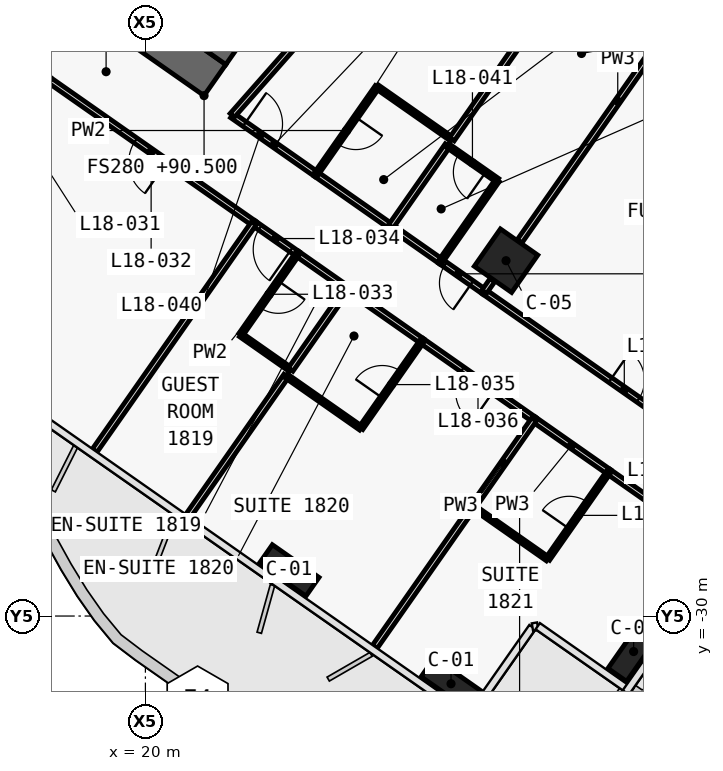
"""IFC4 building model, lengths in metres.
Left out: names, types, materials, properties, quantities, classifications, styles, units other than length and angle.
Written with IfcOpenShell. Run it as: python <this file> out.ifc"""

import sys

from ifc_helpers import new_model, si_unit, direction, frame, frame_2d, origin, origin_2d, place, context, subcontext, project, spatial, polyline, rectangle, outline, extrude, element, fill, save


model = new_model("IFC4")
c1 = context("Model", 3, precision=1e-05, world=origin(), true_north=direction((0.0, 1.0)))
c2 = subcontext(c1, "Body", "Model", "MODEL_VIEW")
j1 = project(units=[si_unit("LENGTHUNIT", "METRE"), si_unit("PLANEANGLEUNIT", "RADIAN")], contexts=[c1])
p1 = place(None, origin())
s1 = spatial("IfcSite", under=j1, at=p1, CompositionType="ELEMENT")
p2 = place(p1, origin())
s2 = spatial("IfcBuilding", under=s1, at=p2, CompositionType="ELEMENT")
p3 = place(p2, frame((0.0, 0.0, 90.5)))
s3 = spatial("IfcBuildingStorey", under=s2, at=p3, CompositionType="ELEMENT", Elevation=90.5)
p4 = place(p3, frame((-0.037, -0.585, 0.0), z_axis=(0.0, 0.0, 1.0), x_axis=(0.819157152511, -0.573569140985, 0.0)))
e1 = element("IfcWall", 1, at=p4, inside=s3, PredefinedType="SHEAR", context=c2, shape_type="SweptSolid", body=[
    extrude(outline(polyline([(26.695, 0.5), (0.0, 0.5), (0.7, -0.5), (26.695, -0.5), (26.695, 0.5)])), origin(), (0.0, 0.0, 1.0), 3.6),
])
p5 = place(p4, frame((1.045, 0.0, 0.0)))
e2 = element("IfcOpeningElement", 2, at=p5, cuts=e1, PredefinedType="OPENING", context=c2, shape_type="SweptSolid", body=[
    extrude(rectangle(XDim=1.5, YDim=2.1, at=frame_2d((0.75, 1.05))), frame((0.0, 0.51, 0.0), z_axis=(0.0, -1.0, 0.0), x_axis=(1.0, 0.0, 0.0)), (0.0, 0.0, 1.0), 1.02),
])
p6 = place(p4, frame((12.445, 0.0, 0.0)))
e3 = element("IfcOpeningElement", 3, at=p6, cuts=e1, PredefinedType="OPENING", context=c2, shape_type="SweptSolid", body=[
    extrude(rectangle(XDim=1.5, YDim=2.1, at=frame_2d((0.75, 1.05))), frame((0.0, 0.51, 0.0), z_axis=(0.0, -1.0, 0.0), x_axis=(1.0, 0.0, 0.0)), (0.0, 0.0, 1.0), 1.02),
])
p7 = place(p3, frame((21.708, -15.2, 0.0), z_axis=(0.0, 0.0, 1.0), x_axis=(0.573576324356, 0.819152122709, 0.0)))
e4 = element("IfcWall", 4, at=p7, inside=s3, PredefinedType="SHEAR", context=c2, shape_type="SweptSolid", body=[
    extrude(outline(polyline([(9.2, 0.5), (0.0, 0.5), (0.0, -0.5), (9.2, -0.5), (9.2, 0.5)])), origin(), (0.0, 0.0, 1.0), 3.6),
])
p8 = place(p7, frame((6.1, 0.0, 0.0)))
e5 = element("IfcOpeningElement", 5, at=p8, cuts=e4, PredefinedType="OPENING", context=c2, shape_type="SweptSolid", body=[
    extrude(rectangle(XDim=1.8, YDim=2.1, at=frame_2d((0.9, 1.05))), frame((0.0, 0.51, 0.0), z_axis=(0.0, -1.0, 0.0), x_axis=(1.0, 0.0, 0.0)), (0.0, 0.0, 1.0), 1.02),
])
p9 = place(p7, frame((1.9, 0.0, 0.0)))
e6 = element("IfcOpeningElement", 6, at=p9, cuts=e4, PredefinedType="OPENING", context=c2, shape_type="SweptSolid", body=[
    extrude(rectangle(XDim=1.8, YDim=2.1, at=frame_2d((0.9, 1.05))), frame((0.0, 0.51, 0.0), z_axis=(0.0, -1.0, 0.0), x_axis=(1.0, 0.0, 0.0)), (0.0, 0.0, 1.0), 1.02),
])
for number, where, z_axis, x_axis in (
    (7, (23.782, -28.799, 0.0), (0.0, 0.0, 1.0), (0.819, -0.574, 0.0)),
    (8, (28.042, -31.782, 0.0), (0.0, 0.0, 1.0), (0.819, -0.574, 0.0)),
    (9, (32.847, -30.935, 0.0), (0.0, 0.0, 1.0), (0.574, 0.819, 0.0)),
):
    element("IfcColumn", number, at=place(p3, frame(where, z_axis=z_axis, x_axis=x_axis)), inside=s3, PredefinedType="COLUMN", context=c2, shape_type="SweptSolid", body=[
        extrude(rectangle(XDim=1.5, YDim=0.6, at=origin_2d()), origin(), (0.0, 0.0, 1.0), 3.6),
    ])
p10 = place(p3, frame((29.49, -20.649, 0.0), z_axis=(0.0, 0.0, 1.0), x_axis=(0.819152044289, -0.573576436351, 0.0)))
e10 = element("IfcColumn", 10, at=p10, inside=s3, PredefinedType="COLUMN", context=c2, shape_type="SweptSolid", body=[
    extrude(rectangle(XDim=1.2, YDim=1.2, at=origin_2d()), origin(), (0.0, 0.0, 1.0), 3.6),
])
p11 = place(p3, frame((22.284, -16.824, 0.0), z_axis=(0.0, 0.0, 1.0), x_axis=(0.819176640776, -0.573541307325, 0.0)))
e11 = element("IfcWall", 11, at=p11, inside=s3, PredefinedType="PARTITIONING", context=c2, shape_type="SweptSolid", body=[
    extrude(rectangle(XDim=2.698, YDim=0.15, at=frame_2d((1.349, 0.0))), origin(), (0.0, 0.0, 1.0), 3.32),
])
p12 = place(p11, frame((0.396, 0.0, 0.0)))
e12 = element("IfcOpeningElement", 12, at=p12, cuts=e11, PredefinedType="OPENING", context=c2, shape_type="SweptSolid", body=[
    extrude(rectangle(XDim=1.0, YDim=2.1, at=frame_2d((0.5, 1.05))), frame((0.0, 0.085, 0.0), z_axis=(0.0, -1.0, 0.0), x_axis=(1.0, 0.0, 0.0)), (0.0, 0.0, 1.0), 0.17),
])
p13 = place(p3, frame((24.491, -18.369, 0.0), z_axis=(0.0, 0.0, 1.0), x_axis=(0.819179439794, -0.573537309527, 0.0)))
e13 = element("IfcWall", 13, at=p13, inside=s3, PredefinedType="PARTITIONING", context=c2, shape_type="SweptSolid", body=[
    extrude(rectangle(XDim=2.404, YDim=0.15, at=frame_2d((1.202, 0.0))), origin(), (0.0, 0.0, 1.0), 3.32),
])
p14 = place(p3, frame((28.917, -21.469, 0.0), z_axis=(0.0, 0.0, 1.0), x_axis=(-0.81914197737, 0.573590813132, 0.0)))
e14 = element("IfcWall", 14, at=p14, inside=s3, PredefinedType="PARTITIONING", context=c2, shape_type="SweptSolid", body=[
    extrude(rectangle(XDim=1.403, YDim=0.15, at=frame_2d((0.701, 0.0))), origin(), (0.0, 0.0, 1.0), 2.6),
])
p15 = place(p14, frame((0.403, 0.0, 0.0)))
e15 = element("IfcOpeningElement", 15, at=p15, cuts=e14, PredefinedType="OPENING", context=c2, shape_type="SweptSolid", body=[
    extrude(rectangle(XDim=0.85, YDim=2.1, at=frame_2d((0.425, 1.05))), frame((0.0, 0.085, 0.0), z_axis=(0.0, -1.0, 0.0), x_axis=(1.0, 0.0, 0.0)), (0.0, 0.0, 1.0), 0.17),
])
p16 = place(p3, frame((26.457, -19.746, 0.0), z_axis=(0.0, 0.0, 1.0), x_axis=(0.819189013667, -0.573523634986, 0.0)))
e16 = element("IfcWall", 16, at=p16, inside=s3, PredefinedType="PARTITIONING", context=c2, shape_type="SweptSolid", body=[
    extrude(rectangle(XDim=1.604, YDim=0.15, at=frame_2d((0.802, 0.0))), origin(), (0.0, 0.0, 1.0), 3.32),
])
p17 = place(p3, frame((28.914, -21.467, 0.0), z_axis=(0.0, 0.0, 1.0), x_axis=(0.81915291695, -0.57357519006, 0.0)))
e17 = element("IfcWall", 17, at=p17, inside=s3, PredefinedType="PARTITIONING", context=c2, shape_type="SweptSolid", body=[
    extrude(rectangle(XDim=9.002, YDim=0.15, at=frame_2d((4.501, 0.0))), origin(), (0.0, 0.0, 1.0), 2.5),
])
p18 = place(p17, frame((4.051, 0.0, 0.0)))
e18 = element("IfcOpeningElement", 18, at=p18, cuts=e17, PredefinedType="OPENING", context=c2, shape_type="SweptSolid", body=[
    extrude(rectangle(XDim=0.9, YDim=2.1, at=frame_2d((0.45, 1.05))), frame((0.0, 0.085, 0.0), z_axis=(0.0, -1.0, 0.0), x_axis=(1.0, 0.0, 0.0)), (0.0, 0.0, 1.0), 0.17),
])
p19 = place(p3, frame((22.855, -19.666, 0.0), z_axis=(0.0, 0.0, 1.0), x_axis=(-0.819153746897, 0.573574004767, 0.0)))
e19 = element("IfcWall", 19, at=p19, inside=s3, PredefinedType="PARTITIONING", context=c2, shape_type="SweptSolid", body=[
    extrude(rectangle(XDim=6.603, YDim=0.15, at=frame_2d((3.302, 0.0))), origin(), (0.0, 0.0, 1.0), 2.6),
])
p20 = place(p19, frame((2.802, 0.0, 0.0)))
e20 = element("IfcOpeningElement", 20, at=p20, cuts=e19, PredefinedType="OPENING", context=c2, shape_type="SweptSolid", body=[
    extrude(rectangle(XDim=1.0, YDim=2.1, at=frame_2d((0.5, 1.05))), frame((0.0, 0.085, 0.0), z_axis=(0.0, -1.0, 0.0), x_axis=(1.0, 0.0, 0.0)), (0.0, 0.0, 1.0), 0.17),
])
p21 = place(p3, frame((24.001, -20.468, 0.0), z_axis=(0.0, 0.0, 1.0), x_axis=(-0.81914197737, 0.573590813132, 0.0)))
e21 = element("IfcWall", 21, at=p21, inside=s3, PredefinedType="PARTITIONING", context=c2, shape_type="SweptSolid", body=[
    extrude(rectangle(XDim=1.403, YDim=0.15, at=frame_2d((0.701, 0.0))), origin(), (0.0, 0.0, 1.0), 3.32),
])
p22 = place(p21, frame((0.201, 0.0, 0.0)))
e22 = element("IfcOpeningElement", 22, at=p22, cuts=e21, PredefinedType="OPENING", context=c2, shape_type="SweptSolid", body=[
    extrude(rectangle(XDim=1.0, YDim=2.1, at=frame_2d((0.5, 1.05))), frame((0.0, 0.085, 0.0), z_axis=(0.0, -1.0, 0.0), x_axis=(1.0, 0.0, 0.0)), (0.0, 0.0, 1.0), 0.17),
])
p23 = place(p3, frame((25.313, -21.387, 0.0), z_axis=(0.0, 0.0, 1.0), x_axis=(-0.819117502046, 0.573625764625, 0.0)))
e23 = element("IfcWall", 23, at=p23, inside=s3, PredefinedType="PARTITIONING", context=c2, shape_type="SweptSolid", body=[
    extrude(rectangle(XDim=1.604, YDim=0.15, at=frame_2d((0.802, 0.0))), origin(), (0.0, 0.0, 1.0), 3.32),
])
p24 = place(p3, frame((30.228, -24.828, 0.0), z_axis=(0.0, 0.0, 1.0), x_axis=(-0.819145961204, 0.573585123798, 0.0)))
e24 = element("IfcWall", 24, at=p24, inside=s3, PredefinedType="PARTITIONING", context=c2, shape_type="SweptSolid", body=[
    extrude(rectangle(XDim=3.603, YDim=0.15, at=frame_2d((1.802, 0.0))), origin(), (0.0, 0.0, 1.0), 2.6),
])
p25 = place(p24, frame((1.302, 0.0, 0.0)))
e25 = element("IfcOpeningElement", 25, at=p25, cuts=e24, PredefinedType="OPENING", context=c2, shape_type="SweptSolid", body=[
    extrude(rectangle(XDim=1.0, YDim=2.1, at=frame_2d((0.5, 1.05))), frame((0.0, 0.085, 0.0), z_axis=(0.0, -1.0, 0.0), x_axis=(1.0, 0.0, 0.0)), (0.0, 0.0, 1.0), 0.17),
])
p26 = place(p3, frame((27.279, -22.763, 0.0), z_axis=(0.0, 0.0, 1.0), x_axis=(-0.819146032251, 0.573585022335, 0.0)))
e26 = element("IfcWall", 26, at=p26, inside=s3, PredefinedType="PARTITIONING", context=c2, shape_type="SweptSolid", body=[
    extrude(rectangle(XDim=2.404, YDim=0.15, at=frame_2d((1.202, 0.0))), origin(), (0.0, 0.0, 1.0), 3.32),
])
p27 = place(p3, frame((35.141, -28.268, 0.0), z_axis=(0.0, 0.0, 1.0), x_axis=(-0.819149096931, 0.573580645591, 0.0)))
e27 = element("IfcWall", 27, at=p27, inside=s3, PredefinedType="PARTITIONING", context=c2, shape_type="SweptSolid", body=[
    extrude(rectangle(XDim=3.601, YDim=0.15, at=frame_2d((1.8, 0.0))), origin(), (0.0, 0.0, 1.0), 2.5),
])
p28 = place(p27, frame((1.2, 0.0, 0.0)))
e28 = element("IfcOpeningElement", 28, at=p28, cuts=e27, PredefinedType="OPENING", context=c2, shape_type="SweptSolid", body=[
    extrude(rectangle(XDim=1.0, YDim=2.1, at=frame_2d((0.5, 1.05))), frame((0.0, 0.085, 0.0), z_axis=(0.0, -1.0, 0.0), x_axis=(1.0, 0.0, 0.0)), (0.0, 0.0, 1.0), 0.17),
])
p29 = place(p3, frame((32.194, -26.205, 0.0), z_axis=(0.0, 0.0, 1.0), x_axis=(-0.819146032251, 0.573585022335, 0.0)))
e29 = element("IfcWall", 29, at=p29, inside=s3, PredefinedType="PARTITIONING", context=c2, shape_type="SweptSolid", body=[
    extrude(rectangle(XDim=2.404, YDim=0.15, at=frame_2d((1.202, 0.0))), origin(), (0.0, 0.0, 1.0), 3.32),
])
p30 = place(p3, frame((26.098, -16.076, 0.0), z_axis=(0.0, 0.0, 1.0), x_axis=(-0.573550118428, -0.819170471667, 0.0)))
e30 = element("IfcWall", 30, at=p30, inside=s3, PredefinedType="PARTITIONING", context=c2, shape_type="SweptSolid", body=[
    extrude(rectangle(XDim=2.8, YDim=0.12, at=frame_2d((1.4, 0.0))), origin(), (0.0, 0.0, 1.0), 2.6),
])
p31 = place(p30, frame((0.975, 0.0, 0.0)))
e31 = element("IfcOpeningElement", 31, at=p31, cuts=e30, PredefinedType="OPENING", context=c2, shape_type="SweptSolid", body=[
    extrude(rectangle(XDim=0.85, YDim=2.05, at=frame_2d((0.425, 1.025))), frame((0.0, 0.07, 0.0), z_axis=(0.0, -1.0, 0.0), x_axis=(1.0, 0.0, 0.0)), (0.0, 0.0, 1.0), 0.14),
])
p32 = place(p3, frame((28.065, -17.453, 0.0), z_axis=(0.0, 0.0, 1.0), x_axis=(-0.819155442668, 0.573571582932, 0.0)))
e32 = element("IfcWall", 32, at=p32, inside=s3, PredefinedType="PARTITIONING", context=c2, shape_type="SweptSolid", body=[
    extrude(rectangle(XDim=2.4, YDim=0.12, at=frame_2d((1.2, 0.0))), origin(), (0.0, 0.0, 1.0), 3.32),
])
p33 = place(p3, frame((32.94, -10.491, 0.0), z_axis=(0.0, 0.0, 1.0), x_axis=(-0.573593433868, -0.819140142237, 0.0)))
e33 = element("IfcWall", 33, at=p33, inside=s3, PredefinedType="PARTITIONING", context=c2, shape_type="SweptSolid", body=[
    extrude(rectangle(XDim=8.499, YDim=0.15, at=frame_2d((4.25, 0.0))), origin(), (0.0, 0.0, 1.0), 2.6),
])
p34 = place(p3, frame((22.285, -16.825, 0.0), z_axis=(0.0, 0.0, 1.0), x_axis=(0.661551268245, 0.749899939647, 0.0)))
e34 = element("IfcWall", 34, at=p34, inside=s3, PredefinedType="PARTITIONING", context=c2, shape_type="SweptSolid", body=[
    extrude(rectangle(XDim=6.541, YDim=0.15, at=frame_2d((3.271, 0.0))), origin(), (0.0, 0.0, 1.0), 2.6),
])
p35 = place(p3, frame((27.951, -17.616, 0.0), z_axis=(0.0, 0.0, 1.0), x_axis=(-0.573544201094, -0.819174614714, 0.0)))
e35 = element("IfcWall", 35, at=p35, inside=s3, PredefinedType="PARTITIONING", context=c2, shape_type="SweptSolid", body=[
    extrude(rectangle(XDim=2.602, YDim=0.15, at=frame_2d((1.301, 0.0))), origin(), (0.0, 0.0, 1.0), 2.6),
])
p36 = place(p3, frame((27.77, -20.666, 0.0), z_axis=(0.0, 0.0, 1.0), x_axis=(0.573537965655, 0.819178980414, 0.0)))
e36 = element("IfcWall", 36, at=p36, inside=s3, PredefinedType="PARTITIONING", context=c2, shape_type="SweptSolid", body=[
    extrude(rectangle(XDim=2.6, YDim=0.12, at=frame_2d((1.3, 0.0))), origin(), (0.0, 0.0, 1.0), 2.6),
])
p37 = place(p3, frame((29.261, -18.534, 0.0), z_axis=(0.0, 0.0, 1.0), x_axis=(-0.819253425856, 0.573431621227, 0.0)))
e37 = element("IfcWall", 37, at=p37, inside=s3, PredefinedType="PARTITIONING", context=c2, shape_type="SweptSolid", body=[
    extrude(rectangle(XDim=1.6, YDim=0.12, at=frame_2d((0.8, 0.0))), origin(), (0.0, 0.0, 1.0), 3.32),
])
p38 = place(p37, frame((0.375, 0.0, 0.0)))
e38 = element("IfcOpeningElement", 38, at=p38, cuts=e37, PredefinedType="OPENING", context=c2, shape_type="SweptSolid", body=[
    extrude(rectangle(XDim=0.85, YDim=2.05, at=frame_2d((0.425, 1.025))), frame((0.0, 0.07, 0.0), z_axis=(0.0, -1.0, 0.0), x_axis=(1.0, 0.0, 0.0)), (0.0, 0.0, 1.0), 0.14),
])
p39 = place(p3, frame((35.013, -12.76, 0.0), z_axis=(0.0, 0.0, 1.0), x_axis=(-0.573558725113, -0.819164445546, 0.0)))
e39 = element("IfcWall", 39, at=p39, inside=s3, PredefinedType="PARTITIONING", context=c2, shape_type="SweptSolid", body=[
    extrude(rectangle(XDim=9.01, YDim=0.15, at=frame_2d((4.505, 0.0))), origin(), (0.0, 0.0, 1.0), 2.6),
])
p40 = place(p3, frame((29.134, -21.156, 0.0), z_axis=(0.0, 0.0, 1.0), x_axis=(-0.572944929411, -0.819593867633, 0.0)))
e40 = element("IfcWall", 40, at=p40, inside=s3, PredefinedType="PARTITIONING", context=c2, shape_type="SweptSolid", body=[
    extrude(rectangle(XDim=0.38, YDim=0.15, at=frame_2d((0.19, 0.0))), origin(), (0.0, 0.0, 1.0), 2.6),
])
p41 = place(p3, frame((22.854, -19.665, 0.0), z_axis=(0.0, 0.0, 1.0), x_axis=(-0.573572324301, -0.819154923562, 0.0)))
e41 = element("IfcWall", 41, at=p41, inside=s3, PredefinedType="PARTITIONING", context=c2, shape_type="SweptSolid", body=[
    extrude(rectangle(XDim=7.3, YDim=0.15, at=frame_2d((3.65, 0.0))), origin(), (0.0, 0.0, 1.0), 2.5),
])
p42 = place(p3, frame((24.0, -20.467, 0.0), z_axis=(0.0, 0.0, 1.0), x_axis=(-0.573582085028, -0.819148089014, 0.0)))
e42 = element("IfcWall", 42, at=p42, inside=s3, PredefinedType="PARTITIONING", context=c2, shape_type="SweptSolid", body=[
    extrude(rectangle(XDim=2.6, YDim=0.12, at=frame_2d((1.3, 0.0))), origin(), (0.0, 0.0, 1.0), 3.32),
])
p43 = place(p42, frame((0.875, 0.0, 0.0)))
e43 = element("IfcOpeningElement", 43, at=p43, cuts=e42, PredefinedType="OPENING", context=c2, shape_type="SweptSolid", body=[
    extrude(rectangle(XDim=0.85, YDim=2.05, at=frame_2d((0.425, 1.025))), frame((0.0, 0.07, 0.0), z_axis=(0.0, -1.0, 0.0), x_axis=(1.0, 0.0, 0.0)), (0.0, 0.0, 1.0), 0.14),
])
p44 = place(p3, frame((22.509, -22.598, 0.0), z_axis=(0.0, 0.0, 1.0), x_axis=(0.819131543282, -0.57360571371, 0.0)))
e44 = element("IfcWall", 44, at=p44, inside=s3, PredefinedType="PARTITIONING", context=c2, shape_type="SweptSolid", body=[
    extrude(rectangle(XDim=1.6, YDim=0.12, at=frame_2d((0.8, 0.0))), origin(), (0.0, 0.0, 1.0), 3.32),
])
p45 = place(p3, frame((23.706, -23.678, 0.0), z_axis=(0.0, 0.0, 1.0), x_axis=(-0.573556991349, -0.819165659482, 0.0)))
e45 = element("IfcWall", 45, at=p45, inside=s3, PredefinedType="PARTITIONING", context=c2, shape_type="SweptSolid", body=[
    extrude(rectangle(XDim=4.501, YDim=0.15, at=frame_2d((2.25, 0.0))), origin(), (0.0, 0.0, 1.0), 2.5),
])
p46 = place(p3, frame((25.311, -21.385, 0.0), z_axis=(0.0, 0.0, 1.0), x_axis=(-0.573537965655, -0.819178980414, 0.0)))
e46 = element("IfcWall", 46, at=p46, inside=s3, PredefinedType="PARTITIONING", context=c2, shape_type="SweptSolid", body=[
    extrude(rectangle(XDim=2.6, YDim=0.15, at=frame_2d((1.3, 0.0))), origin(), (0.0, 0.0, 1.0), 3.32),
])
p47 = place(p3, frame((23.705, -23.68, 0.0), z_axis=(0.0, 0.0, 1.0), x_axis=(0.819188907105, -0.573523787192, 0.0)))
e47 = element("IfcWall", 47, at=p47, inside=s3, PredefinedType="PARTITIONING", context=c2, shape_type="SweptSolid", body=[
    extrude(rectangle(XDim=2.4, YDim=0.12, at=frame_2d((1.2, 0.0))), origin(), (0.0, 0.0, 1.0), 3.32),
])
p48 = place(p3, frame((25.672, -25.056, 0.0), z_axis=(0.0, 0.0, 1.0), x_axis=(0.573550118428, 0.819170471667, 0.0)))
e48 = element("IfcWall", 48, at=p48, inside=s3, PredefinedType="PARTITIONING", context=c2, shape_type="SweptSolid", body=[
    extrude(rectangle(XDim=2.8, YDim=0.12, at=frame_2d((1.4, 0.0))), origin(), (0.0, 0.0, 1.0), 3.32),
])
p49 = place(p48, frame((0.975, 0.0, 0.0)))
e49 = element("IfcOpeningElement", 49, at=p49, cuts=e48, PredefinedType="OPENING", context=c2, shape_type="SweptSolid", body=[
    extrude(rectangle(XDim=0.85, YDim=2.05, at=frame_2d((0.425, 1.025))), frame((0.0, 0.07, 0.0), z_axis=(0.0, -1.0, 0.0), x_axis=(1.0, 0.0, 0.0)), (0.0, 0.0, 1.0), 0.14),
])
p50 = place(p3, frame((28.621, -27.12, 0.0), z_axis=(0.0, 0.0, 1.0), x_axis=(-0.573593387921, -0.81914017441, 0.0)))
e50 = element("IfcWall", 50, at=p50, inside=s3, PredefinedType="PARTITIONING", context=c2, shape_type="SweptSolid", body=[
    extrude(rectangle(XDim=4.501, YDim=0.15, at=frame_2d((2.25, 0.0))), origin(), (0.0, 0.0, 1.0), 2.5),
])
p51 = place(p3, frame((30.226, -24.827, 0.0), z_axis=(0.0, 0.0, 1.0), x_axis=(-0.573614360281, -0.819125488359, 0.0)))
e51 = element("IfcWall", 51, at=p51, inside=s3, PredefinedType="PARTITIONING", context=c2, shape_type="SweptSolid", body=[
    extrude(rectangle(XDim=2.802, YDim=0.15, at=frame_2d((1.401, 0.0))), origin(), (0.0, 0.0, 1.0), 3.32),
])
p52 = place(p3, frame((28.62, -27.121, 0.0), z_axis=(0.0, 0.0, 1.0), x_axis=(0.819141114317, -0.573592045652, 0.0)))
e52 = element("IfcWall", 52, at=p52, inside=s3, PredefinedType="PARTITIONING", context=c2, shape_type="SweptSolid", body=[
    extrude(rectangle(XDim=2.4, YDim=0.12, at=frame_2d((1.2, 0.0))), origin(), (0.0, 0.0, 1.0), 3.32),
])
p53 = place(p3, frame((30.587, -28.498, 0.0), z_axis=(0.0, 0.0, 1.0), x_axis=(0.573608623498, 0.819129505664, 0.0)))
e53 = element("IfcWall", 53, at=p53, inside=s3, PredefinedType="PARTITIONING", context=c2, shape_type="SweptSolid", body=[
    extrude(rectangle(XDim=2.8, YDim=0.12, at=frame_2d((1.4, 0.0))), origin(), (0.0, 0.0, 1.0), 3.32),
])
p54 = place(p53, frame((0.975, 0.0, 0.0)))
e54 = element("IfcOpeningElement", 54, at=p54, cuts=e53, PredefinedType="OPENING", context=c2, shape_type="SweptSolid", body=[
    extrude(rectangle(XDim=0.85, YDim=2.05, at=frame_2d((0.425, 1.025))), frame((0.0, 0.07, 0.0), z_axis=(0.0, -1.0, 0.0), x_axis=(1.0, 0.0, 0.0)), (0.0, 0.0, 1.0), 0.14),
])
p55 = place(p20, origin())
e55 = element("IfcDoor", 55, at=p55, inside=s3, OperationType="SINGLE_SWING_LEFT", PredefinedType="DOOR", context=c2, shape_type="SweptSolid", body=[
    extrude(rectangle(XDim=1.0, YDim=2.1, at=frame_2d((0.5, 1.05))), frame((0.0, 0.025, 0.0), z_axis=(0.0, -1.0, 0.0), x_axis=(1.0, 0.0, 0.0)), (0.0, 0.0, 1.0), 0.05),
])
fill(e20, e55)
p56 = place(p43, origin())
e56 = element("IfcDoor", 56, at=p56, inside=s3, OperationType="SINGLE_SWING_RIGHT", PredefinedType="DOOR", context=c2, shape_type="SweptSolid", body=[
    extrude(rectangle(XDim=0.85, YDim=2.05, at=frame_2d((0.425, 1.025))), frame((0.0, 0.025, 0.0), z_axis=(0.0, -1.0, 0.0), x_axis=(1.0, 0.0, 0.0)), (0.0, 0.0, 1.0), 0.05),
])
fill(e43, e56)
p57 = place(p22, origin())
e57 = element("IfcDoor", 57, at=p57, inside=s3, OperationType="SINGLE_SWING_LEFT", PredefinedType="DOOR", context=c2, shape_type="SweptSolid", body=[
    extrude(rectangle(XDim=1.0, YDim=2.1, at=frame_2d((0.5, 1.05))), frame((0.0, 0.025, 0.0), z_axis=(0.0, -1.0, 0.0), x_axis=(1.0, 0.0, 0.0)), (0.0, 0.0, 1.0), 0.05),
])
fill(e22, e57)
p58 = place(p49, origin())
e58 = element("IfcDoor", 58, at=p58, inside=s3, OperationType="SINGLE_SWING_LEFT", PredefinedType="DOOR", context=c2, shape_type="SweptSolid", body=[
    extrude(rectangle(XDim=0.85, YDim=2.05, at=frame_2d((0.425, 1.025))), frame((0.0, 0.025, 0.0), z_axis=(0.0, -1.0, 0.0), x_axis=(1.0, 0.0, 0.0)), (0.0, 0.0, 1.0), 0.05),
])
fill(e49, e58)
p59 = place(p25, origin())
e59 = element("IfcDoor", 59, at=p59, inside=s3, OperationType="SINGLE_SWING_RIGHT", PredefinedType="DOOR", context=c2, shape_type="SweptSolid", body=[
    extrude(rectangle(XDim=1.0, YDim=2.1, at=frame_2d((0.5, 1.05))), frame((0.0, 0.025, 0.0), z_axis=(0.0, -1.0, 0.0), x_axis=(1.0, 0.0, 0.0)), (0.0, 0.0, 1.0), 0.05),
])
fill(e25, e59)
p60 = place(p54, origin())
e60 = element("IfcDoor", 60, at=p60, inside=s3, OperationType="SINGLE_SWING_LEFT", PredefinedType="DOOR", context=c2, shape_type="SweptSolid", body=[
    extrude(rectangle(XDim=0.85, YDim=2.05, at=frame_2d((0.425, 1.025))), frame((0.0, 0.025, 0.0), z_axis=(0.0, -1.0, 0.0), x_axis=(1.0, 0.0, 0.0)), (0.0, 0.0, 1.0), 0.05),
])
fill(e54, e60)
p61 = place(p31, origin())
e61 = element("IfcDoor", 61, at=p61, inside=s3, OperationType="SINGLE_SWING_LEFT", PredefinedType="DOOR", context=c2, shape_type="SweptSolid", body=[
    extrude(rectangle(XDim=0.85, YDim=2.05, at=frame_2d((0.425, 1.025))), frame((0.0, 0.025, 0.0), z_axis=(0.0, -1.0, 0.0), x_axis=(1.0, 0.0, 0.0)), (0.0, 0.0, 1.0), 0.05),
])
fill(e31, e61)
p62 = place(p12, origin())
e62 = element("IfcDoor", 62, at=p62, inside=s3, OperationType="SINGLE_SWING_RIGHT", PredefinedType="DOOR", context=c2, shape_type="SweptSolid", body=[
    extrude(rectangle(XDim=1.0, YDim=2.1, at=frame_2d((0.5, 1.05))), frame((0.0, 0.025, 0.0), z_axis=(0.0, -1.0, 0.0), x_axis=(1.0, 0.0, 0.0)), (0.0, 0.0, 1.0), 0.05),
])
fill(e12, e62)
p63 = place(p38, origin())
e63 = element("IfcDoor", 63, at=p63, inside=s3, OperationType="SINGLE_SWING_LEFT", PredefinedType="DOOR", context=c2, shape_type="SweptSolid", body=[
    extrude(rectangle(XDim=0.85, YDim=2.05, at=frame_2d((0.425, 1.025))), frame((0.0, 0.025, 0.0), z_axis=(0.0, -1.0, 0.0), x_axis=(1.0, 0.0, 0.0)), (0.0, 0.0, 1.0), 0.05),
])
fill(e38, e63)
p64 = place(p15, origin())
e64 = element("IfcDoor", 64, at=p64, inside=s3, OperationType="SINGLE_SWING_RIGHT", PredefinedType="DOOR", context=c2, shape_type="SweptSolid", body=[
    extrude(rectangle(XDim=0.85, YDim=2.1, at=frame_2d((0.425, 1.05))), frame((0.0, 0.025, 0.0), z_axis=(0.0, -1.0, 0.0), x_axis=(1.0, 0.0, 0.0)), (0.0, 0.0, 1.0), 0.05),
])
fill(e15, e64)
p65 = place(p18, origin())
e65 = element("IfcDoor", 65, at=p65, inside=s3, OperationType="SINGLE_SWING_RIGHT", PredefinedType="DOOR", context=c2, shape_type="SweptSolid", body=[
    extrude(rectangle(XDim=0.9, YDim=2.1, at=frame_2d((0.45, 1.05))), frame((0.0, 0.025, 0.0), z_axis=(0.0, -1.0, 0.0), x_axis=(1.0, 0.0, 0.0)), (0.0, 0.0, 1.0), 0.05),
])
fill(e18, e65)
save(model, sys.argv[1])
